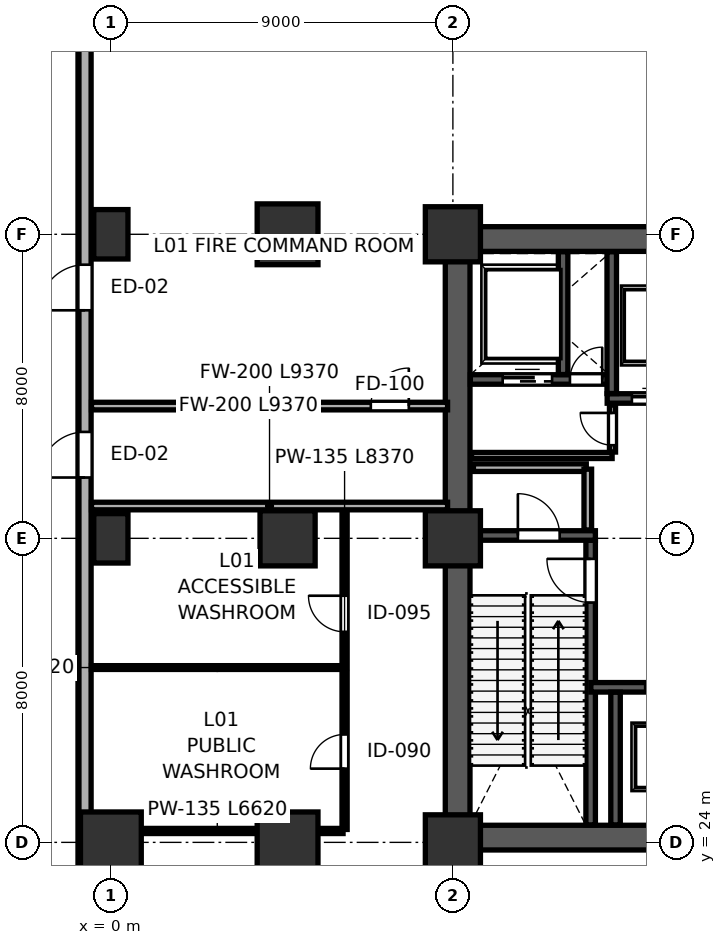
"""IFC4 building model, lengths in metres.
Left out: names, types, materials, properties, quantities, classifications, styles, units other than length and angle.
Written with IfcOpenShell. Run it as: python <this file> out.ifc"""

import sys

from ifc_helpers import new_model, si_unit, direction, frame, frame_2d, origin, origin_2d, place, context, subcontext, project, spatial, rectangle, extrude, source, transform, mapped, element, fill, save


model = new_model("IFC4")
c1 = context("Model", 3, precision=1e-05, world=origin(), true_north=direction((0.0, 1.0)))
c2 = subcontext(c1, "Body", "Model", "MODEL_VIEW")
j1 = project(units=[si_unit("LENGTHUNIT", "METRE"), si_unit("PLANEANGLEUNIT", "RADIAN")], contexts=[c1])
p1 = place(None, origin())
s1 = spatial("IfcSite", under=j1, at=p1, CompositionType="ELEMENT")
p2 = place(p1, origin())
s2 = spatial("IfcBuilding", under=s1, at=p2, CompositionType="ELEMENT")
p3 = place(p2, origin())
s3 = spatial("IfcBuildingStorey", under=s2, at=p3, CompositionType="ELEMENT", Elevation=0.0)
m1 = source(origin(), c2, "Body", "SweptSolid", [
    extrude(rectangle(XDim=1.6, YDim=1.6, at=origin_2d()), origin(), (0.0, 0.0, 1.0), 5.999),
])
p4 = place(p3, frame((0.0, 24.0, 0.001), z_axis=(0.0, 0.0, 1.0), x_axis=(1.0, 0.0, 0.0)))
e1 = element("IfcColumn", 1, at=p4, inside=s3, PredefinedType="COLUMN", context=c2, shape_type="MappedRepresentation", body=[
    mapped(m1, transform((0.0, 0.0, 0.0), scale=1.0)),
])
m2 = source(origin(), c2, "Body", "SweptSolid", [
    extrude(rectangle(XDim=0.9, YDim=1.3, at=origin_2d()), origin(), (0.0, 0.0, 1.0), 5.999),
])
for number, where, z_axis, x_axis in (
    (2, (0.0, 32.0, 0.001), (0.0, 0.0, 1.0), (1.0, 0.0, 0.0)),
    (3, (0.0, 40.0, 0.001), (0.0, 0.0, 1.0), (1.0, 0.0, 0.0)),
):
    element("IfcColumn", number, at=place(p3, frame(where, z_axis=z_axis, x_axis=x_axis)), inside=s3, PredefinedType="PILASTER", context=c2, shape_type="MappedRepresentation", body=[
        mapped(m2, transform((0.0, 0.0, 0.0), scale=1.0)),
    ])
m3 = source(origin(), c2, "Body", "SweptSolid", [
    extrude(rectangle(XDim=1.45, YDim=1.45, at=origin_2d()), origin(), (0.0, 0.0, 1.0), 5.999),
])
p5 = place(p3, frame((9.0, 24.0, 0.001), z_axis=(0.0, 0.0, 1.0), x_axis=(1.0, 0.0, 0.0)))
e4 = element("IfcColumn", 4, at=p5, inside=s3, PredefinedType="COLUMN", context=c2, shape_type="MappedRepresentation", body=[
    mapped(m3, transform((0.0, 0.0, 0.0), scale=1.0)),
])
m4 = source(origin(), c2, "Body", "SweptSolid", [
    extrude(rectangle(XDim=1.45, YDim=1.45, at=origin_2d()), origin(), (0.0, 0.0, 1.0), 5.999),
])
for number, where, z_axis, x_axis in (
    (5, (9.0, 32.0, 0.001), (0.0, 0.0, 1.0), (1.0, 0.0, 0.0)),
    (6, (9.0, 40.0, 0.001), (0.0, 0.0, 1.0), (1.0, 0.0, 0.0)),
):
    element("IfcColumn", number, at=place(p3, frame(where, z_axis=z_axis, x_axis=x_axis)), inside=s3, PredefinedType="COLUMN", context=c2, shape_type="MappedRepresentation", body=[
        mapped(m4, transform((0.0, 0.0, 0.0), scale=1.0)),
    ])
p6 = place(p3, frame((4.65, 24.0, 0.001), z_axis=(0.0, 0.0, 1.0), x_axis=(1.0, 0.0, 0.0)))
e7 = element("IfcColumn", 7, at=p6, inside=s3, PredefinedType="COLUMN", context=c2, shape_type="MappedRepresentation", body=[
    mapped(m1, transform((0.0, 0.0, 0.0), scale=1.0)),
])
p7 = place(p3, frame((4.65, 32.0, 0.001), z_axis=(0.0, 0.0, 1.0), x_axis=(1.0, 0.0, 0.0)))
e8 = element("IfcColumn", 8, at=p7, inside=s3, PredefinedType="COLUMN", context=c2, shape_type="MappedRepresentation", body=[
    mapped(m4, transform((0.0, 0.0, 0.0), scale=1.0)),
])
m5 = source(origin(), c2, "Body", "SweptSolid", [
    extrude(rectangle(XDim=1.6, YDim=1.6, at=origin_2d()), origin(), (0.0, 0.0, 1.0), 5.999),
])
p8 = place(p3, frame((4.65, 40.0, 0.001), z_axis=(0.0, 0.0, 1.0), x_axis=(1.0, 0.0, 0.0)))
e9 = element("IfcColumn", 9, at=p8, inside=s3, PredefinedType="COLUMN", context=c2, shape_type="MappedRepresentation", body=[
    mapped(m5, transform((0.0, 0.0, 0.0), scale=1.0)),
])
p9 = place(p3, frame((-0.68, 3.6, 0.0), z_axis=(0.0, 0.0, 1.0), x_axis=(0.0, 1.0, 0.0)))
e10 = element("IfcWall", 10, at=p9, inside=s3, PredefinedType="SOLIDWALL", context=c2, shape_type="SweptSolid", body=[
    extrude(rectangle(XDim=49.8, YDim=0.32, at=frame_2d((24.9, 0.0))), origin(), (0.0, 0.0, 1.0), 5.74),
])
p10 = place(p9, frame((34.4, 0.0, 0.0)))
e11 = element("IfcOpeningElement", 11, at=p10, cuts=e10, PredefinedType="OPENING", context=c2, shape_type="SweptSolid", body=[
    extrude(rectangle(XDim=1.2, YDim=2.2, at=frame_2d((0.6, 1.1))), frame((0.0, 0.17, 0.0), z_axis=(0.0, -1.0, 0.0), x_axis=(1.0, 0.0, 0.0)), (0.0, 0.0, 1.0), 0.34),
])
p11 = place(p9, frame((30.0, 0.0, 0.0)))
e12 = element("IfcOpeningElement", 12, at=p11, cuts=e10, PredefinedType="OPENING", context=c2, shape_type="SweptSolid", body=[
    extrude(rectangle(XDim=1.2, YDim=2.2, at=frame_2d((0.6, 1.1))), frame((0.0, 0.17, 0.0), z_axis=(0.0, -1.0, 0.0), x_axis=(1.0, 0.0, 0.0)), (0.0, 0.0, 1.0), 0.34),
])
p12 = place(p9, frame((5.4, 0.0, 0.0)))
e13 = element("IfcOpeningElement", 13, at=p12, cuts=e10, PredefinedType="OPENING", context=c2, shape_type="SweptSolid", body=[
    extrude(rectangle(XDim=1.2, YDim=2.2, at=frame_2d((0.6, 1.1))), frame((0.0, 0.17, 0.0), z_axis=(0.0, -1.0, 0.0), x_axis=(1.0, 0.0, 0.0)), (0.0, 0.0, 1.0), 0.34),
])
p13 = place(p3, frame((9.125, 24.45, 0.0), z_axis=(0.0, 0.0, 1.0), x_axis=(0.0, 1.0, 0.0)))
e14 = element("IfcWall", 14, at=p13, inside=s3, PredefinedType="SHEAR", context=c2, shape_type="SweptSolid", body=[
    extrude(rectangle(XDim=15.1, YDim=0.65, at=frame_2d((7.55, 0.0))), origin(), (0.0, 0.0, 1.0), 5.74),
])
for number, where, z_axis, x_axis in (
    (15, (8.8, 24.125, 0.0), (0.0, 0.0, 1.0), (1.0, 0.0, 0.0)),
    (16, (8.8, 39.875, 0.0), (0.0, 0.0, 1.0), (1.0, 0.0, 0.0)),
):
    element("IfcWall", number, at=place(p3, frame(where, z_axis=z_axis, x_axis=x_axis)), inside=s3, PredefinedType="SHEAR", context=c2, shape_type="SweptSolid", body=[
        extrude(rectangle(XDim=18.4, YDim=0.65, at=frame_2d((9.2, 0.0))), origin(), (0.0, 0.0, 1.0), 5.74),
    ])
p14 = place(p3, frame((12.625, 24.46, 0.0), z_axis=(0.0, 0.0, 1.0), x_axis=(0.0, 1.0, 0.0)))
e17 = element("IfcWall", 17, at=p14, inside=s3, PredefinedType="SHEAR", context=c2, shape_type="SweptSolid", body=[
    extrude(rectangle(XDim=7.49, YDim=0.25, at=frame_2d((3.745, 0.0))), origin(), (0.0, 0.0, 1.0), 5.74),
])
p15 = place(p14, frame((5.85, 0.0, 0.0)))
e18 = element("IfcOpeningElement", 18, at=p15, cuts=e17, PredefinedType="OPENING", context=c2, shape_type="SweptSolid", body=[
    extrude(rectangle(XDim=1.15, YDim=2.2, at=frame_2d((0.575, 1.1))), frame((0.0, 0.135, 0.0), z_axis=(0.0, -1.0, 0.0), x_axis=(1.0, 0.0, 0.0)), (0.0, 0.0, 1.0), 0.27),
])
p16 = place(p3, frame((9.46, 32.075, 0.0), z_axis=(0.0, 0.0, 1.0), x_axis=(1.0, 0.0, 0.0)))
e19 = element("IfcWall", 19, at=p16, inside=s3, PredefinedType="SHEAR", context=c2, shape_type="SweptSolid", body=[
    extrude(rectangle(XDim=3.29, YDim=0.25, at=frame_2d((1.645, 0.0))), origin(), (0.0, 0.0, 1.0), 5.74),
])
p17 = place(p16, frame((1.25, 0.0, 0.0)))
e20 = element("IfcOpeningElement", 20, at=p17, cuts=e19, PredefinedType="OPENING", context=c2, shape_type="SweptSolid", body=[
    extrude(rectangle(XDim=1.1, YDim=2.2, at=frame_2d((0.55, 1.1))), frame((0.0, 0.135, 0.0), z_axis=(0.0, -1.0, 0.0), x_axis=(1.0, 0.0, 0.0)), (0.0, 0.0, 1.0), 0.27),
])
p18 = place(p3, frame((9.46, 36.18, 0.0), z_axis=(0.0, 0.0, 1.0), x_axis=(1.0, 0.0, 0.0)))
e21 = element("IfcWall", 21, at=p18, inside=s3, PredefinedType="SHEAR", context=c2, shape_type="SweptSolid", body=[
    extrude(rectangle(XDim=3.79, YDim=0.25, at=frame_2d((1.895, 0.0))), origin(), (0.0, 0.0, 1.0), 5.74),
])
p19 = place(p18, frame((2.62, 0.0, 0.0)))
e22 = element("IfcOpeningElement", 22, at=p19, cuts=e21, PredefinedType="OPENING", context=c2, shape_type="SweptSolid", body=[
    extrude(rectangle(XDim=0.85, YDim=2.1, at=frame_2d((0.425, 1.05))), frame((0.0, 0.135, 0.0), z_axis=(0.0, -1.0, 0.0), x_axis=(1.0, 0.0, 0.0)), (0.0, 0.0, 1.0), 0.27),
])
p20 = place(p18, frame((0.85, 0.0, 0.0)))
e23 = element("IfcOpeningElement", 23, at=p20, cuts=e21, PredefinedType="OPENING", context=c2, shape_type="SweptSolid", body=[
    extrude(rectangle(XDim=1.3, YDim=2.25, at=frame_2d((0.65, 1.125))), frame((0.0, 0.135, 0.0), z_axis=(0.0, -1.0, 0.0), x_axis=(1.0, 0.0, 0.0)), (0.0, 0.0, 1.0), 0.27),
])
p21 = place(p3, frame((11.9, 36.31, 0.0), z_axis=(0.0, 0.0, 1.0), x_axis=(0.0, 1.0, 0.0)))
e24 = element("IfcWall", 24, at=p21, inside=s3, PredefinedType="SHEAR", context=c2, shape_type="SweptSolid", body=[
    extrude(rectangle(XDim=3.23, YDim=0.25, at=frame_2d((1.615, 0.0))), origin(), (0.0, 0.0, 1.0), 5.74),
])
p22 = place(p3, frame((12.63, 28.08, 0.0), z_axis=(0.0, 0.0, 1.0), x_axis=(1.0, 0.0, 0.0)))
e25 = element("IfcWall", 25, at=p22, inside=s3, PredefinedType="SHEAR", context=c2, shape_type="SweptSolid", body=[
    extrude(rectangle(XDim=6.71, YDim=0.25, at=frame_2d((3.355, 0.0))), origin(), (0.0, 0.0, 1.0), 5.74),
])
p23 = place(p22, frame((1.43, 0.0, 0.0)))
e26 = element("IfcOpeningElement", 26, at=p23, cuts=e25, PredefinedType="OPENING", context=c2, shape_type="SweptSolid", body=[
    extrude(rectangle(XDim=1.1, YDim=2.2, at=frame_2d((0.55, 1.1))), frame((0.0, 0.135, 0.0), z_axis=(0.0, -1.0, 0.0), x_axis=(1.0, 0.0, 0.0)), (0.0, 0.0, 1.0), 0.27),
])
p24 = place(p22, frame((4.43, 0.0, 0.0)))
e27 = element("IfcOpeningElement", 27, at=p24, cuts=e25, PredefinedType="OPENING", context=c2, shape_type="SweptSolid", body=[
    extrude(rectangle(XDim=1.1, YDim=2.2, at=frame_2d((0.55, 1.1))), frame((0.0, 0.135, 0.0), z_axis=(0.0, -1.0, 0.0), x_axis=(1.0, 0.0, 0.0)), (0.0, 0.0, 1.0), 0.27),
])
p25 = place(p3, frame((13.28, 24.46, 0.0), z_axis=(0.0, 0.0, 1.0), x_axis=(0.0, 1.0, 0.0)))
e28 = element("IfcWall", 28, at=p25, inside=s3, PredefinedType="SHEAR", context=c2, shape_type="SweptSolid", body=[
    extrude(rectangle(XDim=3.49, YDim=0.25, at=frame_2d((1.745, 0.0))), origin(), (0.0, 0.0, 1.0), 5.74),
])
p26 = place(p3, frame((13.06, 35.68, 0.0), z_axis=(0.0, 0.0, 1.0), x_axis=(1.0, 0.0, 0.0)))
e29 = element("IfcWall", 29, at=p26, inside=s3, PredefinedType="SHEAR", context=c2, shape_type="SweptSolid", body=[
    extrude(rectangle(XDim=4.25, YDim=0.25, at=frame_2d((2.125, 0.0))), origin(), (0.0, 0.0, 1.0), 5.74),
])
p27 = place(p26, frame((0.65, 0.0, 0.0)))
e30 = element("IfcOpeningElement", 30, at=p27, cuts=e29, PredefinedType="OPENING", context=c2, shape_type="SweptSolid", body=[
    extrude(rectangle(XDim=1.1, YDim=2.2, at=frame_2d((0.55, 1.1))), frame((0.0, 0.135, 0.0), z_axis=(0.0, -1.0, 0.0), x_axis=(1.0, 0.0, 0.0)), (0.0, 0.0, 1.0), 0.27),
])
p28 = place(p26, frame((2.65, 0.0, 0.0)))
e31 = element("IfcOpeningElement", 31, at=p28, cuts=e29, PredefinedType="OPENING", context=c2, shape_type="SweptSolid", body=[
    extrude(rectangle(XDim=1.1, YDim=2.2, at=frame_2d((0.55, 1.1))), frame((0.0, 0.135, 0.0), z_axis=(0.0, -1.0, 0.0), x_axis=(1.0, 0.0, 0.0)), (0.0, 0.0, 1.0), 0.27),
])
p29 = place(p3, frame((13.18, 35.81, 0.0), z_axis=(0.0, 0.0, 1.0), x_axis=(0.0, 1.0, 0.0)))
e32 = element("IfcWall", 32, at=p29, inside=s3, PredefinedType="SHEAR", context=c2, shape_type="SweptSolid", body=[
    extrude(rectangle(XDim=3.73, YDim=0.25, at=frame_2d((1.865, 0.0))), origin(), (0.0, 0.0, 1.0), 5.74),
])
p30 = place(p3, frame((9.49, 34.18, 0.0), z_axis=(0.0, 0.0, 1.0), x_axis=(1.0, 0.0, 0.0)))
e33 = element("IfcWall", 33, at=p30, inside=s3, PredefinedType="PARTITIONING", context=c2, shape_type="SweptSolid", body=[
    extrude(rectangle(XDim=3.7, YDim=0.16, at=frame_2d((1.85, 0.0))), origin(), (0.0, 0.0, 1.0), 5.74),
])
p31 = place(p3, frame((13.2, 34.27, 0.0), z_axis=(0.0, 0.0, 1.0), x_axis=(0.0, 1.0, 0.0)))
e34 = element("IfcWall", 34, at=p31, inside=s3, PredefinedType="PARTITIONING", context=c2, shape_type="SweptSolid", body=[
    extrude(rectangle(XDim=1.24, YDim=0.16, at=frame_2d((0.62, 0.0))), origin(), (0.0, 0.0, 1.0), 5.74),
])
p32 = place(p31, frame((0.18, 0.0, 0.0)))
e35 = element("IfcOpeningElement", 35, at=p32, cuts=e34, PredefinedType="OPENING", context=c2, shape_type="SweptSolid", body=[
    extrude(rectangle(XDim=0.85, YDim=2.1, at=frame_2d((0.425, 1.05))), frame((0.0, 0.09, 0.0), z_axis=(0.0, -1.0, 0.0), x_axis=(1.0, 0.0, 0.0)), (0.0, 0.0, 1.0), 0.18),
])
p33 = place(p3, frame((-0.51, 24.3, 0.0), z_axis=(0.0, 0.0, 1.0), x_axis=(1.0, 0.0, 0.0)))
e36 = element("IfcWall", 36, at=p33, inside=s3, PredefinedType="PARTITIONING", context=c2, shape_type="SweptSolid", body=[
    extrude(rectangle(XDim=6.62, YDim=0.135, at=frame_2d((3.31, 0.0))), origin(), (0.0, 0.0, 1.0), 4.869),
])
p34 = place(p3, frame((-0.51, 28.6, 0.0), z_axis=(0.0, 0.0, 1.0), x_axis=(1.0, 0.0, 0.0)))
e37 = element("IfcWall", 37, at=p34, inside=s3, PredefinedType="PARTITIONING", context=c2, shape_type="SweptSolid", body=[
    extrude(rectangle(XDim=6.62, YDim=0.1, at=frame_2d((3.31, 0.0))), origin(), (0.0, 0.0, 1.0), 4.875),
])
p35 = place(p3, frame((6.15, 24.34, 0.0), z_axis=(0.0, 0.0, 1.0), x_axis=(0.0, 1.0, 0.0)))
e38 = element("IfcWall", 38, at=p35, inside=s3, PredefinedType="PARTITIONING", context=c2, shape_type="SweptSolid", body=[
    extrude(rectangle(XDim=8.37, YDim=0.135, at=frame_2d((4.185, 0.0))), origin(), (0.0, 0.0, 1.0), 4.875),
])
p36 = place(p35, frame((1.6, 0.0, 0.0)))
e39 = element("IfcOpeningElement", 39, at=p36, cuts=e38, PredefinedType="OPENING", context=c2, shape_type="SweptSolid", body=[
    extrude(rectangle(XDim=0.9, YDim=2.15, at=frame_2d((0.45, 1.075))), frame((0.0, 0.078, 0.0), z_axis=(0.0, -1.0, 0.0), x_axis=(1.0, 0.0, 0.0)), (0.0, 0.0, 1.0), 0.155),
])
p37 = place(p35, frame((5.2, 0.0, 0.0)))
e40 = element("IfcOpeningElement", 40, at=p37, cuts=e38, PredefinedType="OPENING", context=c2, shape_type="SweptSolid", body=[
    extrude(rectangle(XDim=0.95, YDim=2.15, at=frame_2d((0.475, 1.075))), frame((0.0, 0.078, 0.0), z_axis=(0.0, -1.0, 0.0), x_axis=(1.0, 0.0, 0.0)), (0.0, 0.0, 1.0), 0.155),
])
p38 = place(p3, frame((-0.51, 32.85, 0.0), z_axis=(0.0, 0.0, 1.0), x_axis=(1.0, 0.0, 0.0)))
e41 = element("IfcWall", 41, at=p38, inside=s3, PredefinedType="SOLIDWALL", context=c2, shape_type="SweptSolid", body=[
    extrude(rectangle(XDim=9.37, YDim=0.2, at=frame_2d((4.685, 0.0))), origin(), (0.0, 0.0, 1.0), 4.875),
])
p39 = place(p3, frame((-0.51, 35.48, 0.0), z_axis=(0.0, 0.0, 1.0), x_axis=(1.0, 0.0, 0.0)))
e42 = element("IfcWall", 42, at=p39, inside=s3, PredefinedType="SOLIDWALL", context=c2, shape_type="SweptSolid", body=[
    extrude(rectangle(XDim=9.37, YDim=0.2, at=frame_2d((4.685, 0.0))), origin(), (0.0, 0.0, 1.0), 4.875),
])
p40 = place(p39, frame((7.35, 0.0, 0.0)))
e43 = element("IfcOpeningElement", 43, at=p40, cuts=e42, PredefinedType="OPENING", context=c2, shape_type="SweptSolid", body=[
    extrude(rectangle(XDim=1.0, YDim=2.15, at=frame_2d((0.5, 1.075))), frame((0.0, 0.11, 0.0), z_axis=(0.0, -1.0, 0.0), x_axis=(1.0, 0.0, 0.0)), (0.0, 0.0, 1.0), 0.22),
])
p41 = place(p3, frame((9.54, 33.86, 0.0), z_axis=(0.0, 0.0, 1.0), x_axis=(1.0, 0.0, 0.0)))
e44 = element("IfcWall", 44, at=p41, inside=s3, PredefinedType="SOLIDWALL", context=c2, shape_type="SweptSolid", body=[
    extrude(rectangle(XDim=2.97, YDim=0.2, at=frame_2d((1.485, 0.0))), origin(), (0.0, 0.0, 1.0), 5.74),
])
p42 = place(p3, frame((12.55, 32.22, 0.0), z_axis=(0.0, 0.0, 1.0), x_axis=(0.0, 1.0, 0.0)))
e45 = element("IfcWall", 45, at=p42, inside=s3, PredefinedType="SOLIDWALL", context=c2, shape_type="SweptSolid", body=[
    extrude(rectangle(XDim=1.6, YDim=0.2, at=frame_2d((0.8, 0.0))), origin(), (0.0, 0.0, 1.0), 5.74),
])
m6 = source(origin(), c2, "Body", "SweptSolid", [
    extrude(rectangle(XDim=1.2, YDim=2.2, at=frame_2d((0.6, 1.1))), frame((0.0, 0.025, 0.0), z_axis=(0.0, -1.0, 0.0), x_axis=(1.0, 0.0, 0.0)), (0.0, 0.0, 1.0), 0.05),
])
p43 = place(p10, origin())
e46 = element("IfcDoor", 46, at=p43, inside=s3, OperationType="SINGLE_SWING_LEFT", PredefinedType="DOOR", context=c2, shape_type="MappedRepresentation", body=[
    mapped(m6, transform((0.0, 0.0, 0.0), scale=1.0)),
])
fill(e11, e46)
p44 = place(p11, origin())
e47 = element("IfcDoor", 47, at=p44, inside=s3, OperationType="SINGLE_SWING_LEFT", PredefinedType="DOOR", context=c2, shape_type="MappedRepresentation", body=[
    mapped(m6, transform((0.0, 0.0, 0.0), scale=1.0)),
])
fill(e12, e47)
m7 = source(origin(), c2, "Body", "SweptSolid", [
    extrude(rectangle(XDim=1.15, YDim=2.2, at=frame_2d((0.575, 1.1))), frame((0.0, 0.025, 0.0), z_axis=(0.0, -1.0, 0.0), x_axis=(1.0, 0.0, 0.0)), (0.0, 0.0, 1.0), 0.05),
])
p45 = place(p15, origin())
e48 = element("IfcDoor", 48, at=p45, inside=s3, OperationType="SINGLE_SWING_RIGHT", PredefinedType="DOOR", context=c2, shape_type="MappedRepresentation", body=[
    mapped(m7, transform((0.0, 0.0, 0.0), scale=1.0)),
])
fill(e18, e48)
m8 = source(origin(), c2, "Body", "SweptSolid", [
    extrude(rectangle(XDim=0.85, YDim=2.1, at=frame_2d((0.425, 1.05))), frame((0.0, 0.025, 0.0), z_axis=(0.0, -1.0, 0.0), x_axis=(1.0, 0.0, 0.0)), (0.0, 0.0, 1.0), 0.05),
])
p46 = place(p19, origin())
e49 = element("IfcDoor", 49, at=p46, inside=s3, OperationType="SINGLE_SWING_RIGHT", PredefinedType="DOOR", context=c2, shape_type="MappedRepresentation", body=[
    mapped(m8, transform((0.0, 0.0, 0.0), scale=1.0)),
])
fill(e22, e49)
m9 = source(origin(), c2, "Body", "SweptSolid", [
    extrude(rectangle(XDim=1.1, YDim=2.2, at=frame_2d((0.55, 1.1))), frame((0.0, 0.025, 0.0), z_axis=(0.0, -1.0, 0.0), x_axis=(1.0, 0.0, 0.0)), (0.0, 0.0, 1.0), 0.05),
])
p47 = place(p17, origin())
e50 = element("IfcDoor", 50, at=p47, inside=s3, OperationType="SINGLE_SWING_LEFT", PredefinedType="DOOR", context=c2, shape_type="MappedRepresentation", body=[
    mapped(m9, transform((0.0, 0.0, 0.0), scale=1.0)),
])
fill(e20, e50)
m10 = source(origin(), c2, "Body", "SweptSolid", [
    extrude(rectangle(XDim=1.1, YDim=2.2, at=frame_2d((0.55, 1.1))), frame((0.0, 0.025, 0.0), z_axis=(0.0, -1.0, 0.0), x_axis=(1.0, 0.0, 0.0)), (0.0, 0.0, 1.0), 0.05),
])
p48 = place(p23, origin())
e51 = element("IfcDoor", 51, at=p48, inside=s3, OperationType="SLIDING_TO_LEFT", PredefinedType="DOOR", context=c2, shape_type="MappedRepresentation", body=[
    mapped(m10, transform((0.0, 0.0, 0.0), scale=1.0)),
])
fill(e26, e51)
p49 = place(p27, origin())
e52 = element("IfcDoor", 52, at=p49, inside=s3, OperationType="SLIDING_TO_LEFT", PredefinedType="DOOR", context=c2, shape_type="MappedRepresentation", body=[
    mapped(m10, transform((0.0, 0.0, 0.0), scale=1.0)),
])
fill(e30, e52)
m11 = source(origin(), c2, "Body", "SweptSolid", [
    extrude(rectangle(XDim=1.3, YDim=2.25, at=frame_2d((0.65, 1.125))), frame((0.0, 0.025, 0.0), z_axis=(0.0, -1.0, 0.0), x_axis=(1.0, 0.0, 0.0)), (0.0, 0.0, 1.0), 0.05),
])
p50 = place(p20, origin())
e53 = element("IfcDoor", 53, at=p50, inside=s3, OperationType="SLIDING_TO_LEFT", PredefinedType="DOOR", context=c2, shape_type="MappedRepresentation", body=[
    mapped(m11, transform((0.0, 0.0, 0.0), scale=1.0)),
])
fill(e23, e53)
p51 = place(p32, origin())
e54 = element("IfcDoor", 54, at=p51, inside=s3, OperationType="SINGLE_SWING_RIGHT", PredefinedType="DOOR", context=c2, shape_type="MappedRepresentation", body=[
    mapped(m8, transform((0.0, 0.0, 0.0), scale=1.0)),
])
fill(e35, e54)
m12 = source(origin(), c2, "Body", "SweptSolid", [
    extrude(rectangle(XDim=0.9, YDim=2.15, at=frame_2d((0.45, 1.075))), frame((0.0, 0.025, 0.0), z_axis=(0.0, -1.0, 0.0), x_axis=(1.0, 0.0, 0.0)), (0.0, 0.0, 1.0), 0.05),
])
p52 = place(p36, origin())
e55 = element("IfcDoor", 55, at=p52, inside=s3, OperationType="SINGLE_SWING_LEFT", PredefinedType="DOOR", context=c2, shape_type="MappedRepresentation", body=[
    mapped(m12, transform((0.0, 0.0, 0.0), scale=1.0)),
])
fill(e39, e55)
m13 = source(origin(), c2, "Body", "SweptSolid", [
    extrude(rectangle(XDim=0.95, YDim=2.15, at=frame_2d((0.475, 1.075))), frame((0.0, 0.025, 0.0), z_axis=(0.0, -1.0, 0.0), x_axis=(1.0, 0.0, 0.0)), (0.0, 0.0, 1.0), 0.05),
])
p53 = place(p37, origin())
e56 = element("IfcDoor", 56, at=p53, inside=s3, OperationType="SINGLE_SWING_RIGHT", PredefinedType="DOOR", context=c2, shape_type="MappedRepresentation", body=[
    mapped(m13, transform((0.0, 0.0, 0.0), scale=1.0)),
])
fill(e40, e56)
m14 = source(origin(), c2, "Body", "SweptSolid", [
    extrude(rectangle(XDim=1.0, YDim=2.15, at=frame_2d((0.5, 1.075))), frame((0.0, 0.025, 0.0), z_axis=(0.0, -1.0, 0.0), x_axis=(1.0, 0.0, 0.0)), (0.0, 0.0, 1.0), 0.05),
])
p54 = place(p40, origin())
e57 = element("IfcDoor", 57, at=p54, inside=s3, OperationType="SINGLE_SWING_RIGHT", PredefinedType="DOOR", context=c2, shape_type="MappedRepresentation", body=[
    mapped(m14, transform((0.0, 0.0, 0.0), scale=1.0)),
])
fill(e43, e57)
save(model, sys.argv[1])
